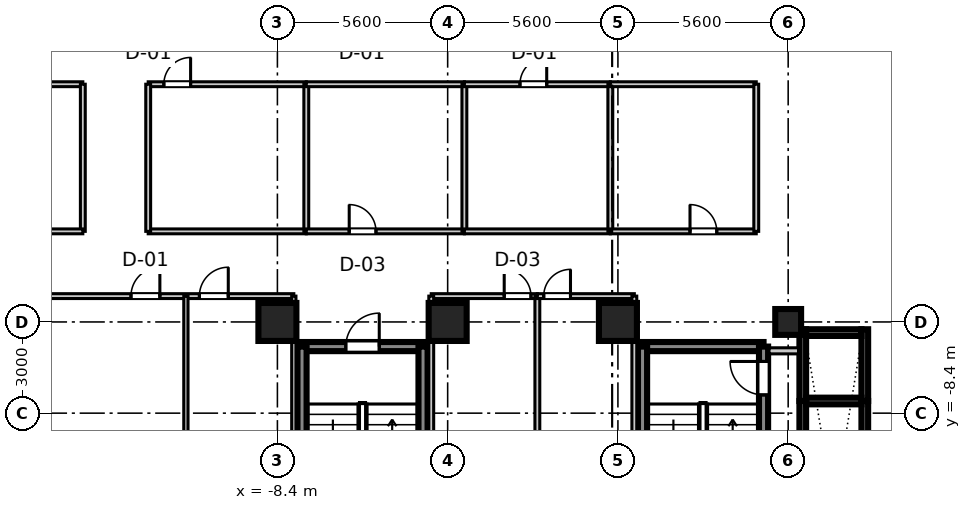
"""IFC4 building model, lengths in metres.
Left out: names, types, materials, properties, quantities, classifications, styles, units other than length and angle.
Written with IfcOpenShell. Run it as: python <this file> out.ifc"""

import sys

from ifc_helpers import new_model, si_unit, direction, frame, frame_2d, origin, origin_2d, place, context, subcontext, project, spatial, rectangle, extrude, source, transform, mapped, element, fill, save


model = new_model("IFC4")
c1 = context("Model", 3, precision=1e-05, world=origin(), true_north=direction((0.0, 1.0)))
c2 = subcontext(c1, "Body", "Model", "MODEL_VIEW")
j1 = project(units=[si_unit("LENGTHUNIT", "METRE"), si_unit("PLANEANGLEUNIT", "RADIAN")], contexts=[c1])
p1 = place(None, origin())
s1 = spatial("IfcSite", under=j1, at=p1, CompositionType="ELEMENT")
p2 = place(p1, origin())
s2 = spatial("IfcBuilding", under=s1, at=p2, CompositionType="ELEMENT")
p3 = place(p2, frame((0.0, 0.0, 132.1)))
s3 = spatial("IfcBuildingStorey", under=s2, at=p3, CompositionType="ELEMENT", Elevation=132.1)
m1 = source(origin(), c2, "Body", "SweptSolid", [
    extrude(rectangle(XDim=1.25, YDim=1.25, at=origin_2d()), origin(), (0.0, 0.0, 1.0), 3.605),
])
for number, where, z_axis, x_axis in (
    (1, (-8.4, -5.4, 0.0), (0.0, 0.0, 1.0), (1.0, 0.0, 0.0)),
    (2, (-2.8, -5.4, 0.0), (0.0, 0.0, 1.0), (1.0, 0.0, 0.0)),
    (3, (2.8, -5.4, 0.0), (0.0, 0.0, 1.0), (1.0, 0.0, 0.0)),
):
    element("IfcColumn", number, at=place(p3, frame(where, z_axis=z_axis, x_axis=x_axis)), inside=s3, PredefinedType="COLUMN", context=c2, shape_type="MappedRepresentation", body=[
        mapped(m1, transform((0.0, 0.0, 0.0), scale=1.0)),
    ])
m2 = source(origin(), c2, "Body", "SweptSolid", [
    extrude(rectangle(XDim=0.85, YDim=0.85, at=origin_2d()), origin(), (0.0, 0.0, 1.0), 3.605),
])
p4 = place(p3, frame((8.4, -5.4, 0.0), z_axis=(0.0, 0.0, 1.0), x_axis=(1.0, 0.0, 0.0)))
e4 = element("IfcColumn", 4, at=p4, inside=s3, PredefinedType="PILASTER", context=c2, shape_type="MappedRepresentation", body=[
    mapped(m2, transform((0.0, 0.0, 0.0), scale=1.0)),
])
m3 = source(origin(), c2, "Body", "SweptSolid", [
    extrude(rectangle(XDim=3.98, YDim=0.3, at=frame_2d((1.99, 0.0))), origin(), (0.0, 0.0, 1.0), 3.38),
])
p5 = place(p3, frame((3.61, -6.21, 0.0), z_axis=(0.0, 0.0, 1.0), x_axis=(1.0, 0.0, 0.0)))
e5 = element("IfcWall", 5, at=p5, inside=s3, PredefinedType="SHEAR", context=c2, shape_type="MappedRepresentation", body=[
    mapped(m3, transform((0.0, 0.0, 0.0), scale=1.0)),
])
m4 = source(origin(), c2, "Body", "SweptSolid", [
    extrude(rectangle(XDim=9.38, YDim=0.3, at=frame_2d((4.69, 0.0))), origin(), (0.0, 0.0, 1.0), 3.38),
])
p6 = place(p3, frame((3.61, -15.59, 0.0), z_axis=(0.0, 0.0, 1.0), x_axis=(0.0, 1.0, 0.0)))
e6 = element("IfcWall", 6, at=p6, inside=s3, PredefinedType="SHEAR", context=c2, shape_type="MappedRepresentation", body=[
    mapped(m4, transform((0.0, 0.0, 0.0), scale=1.0)),
])
p7 = place(p3, frame((7.59, -15.59, 0.0), z_axis=(0.0, 0.0, 1.0), x_axis=(0.0, 1.0, 0.0)))
e7 = element("IfcWall", 7, at=p7, inside=s3, PredefinedType="SHEAR", context=c2, shape_type="MappedRepresentation", body=[
    mapped(m4, transform((0.0, 0.0, 0.0), scale=1.0)),
])
p8 = place(p7, frame((7.79, 0.0, 0.0)))
e8 = element("IfcOpeningElement", 8, at=p8, cuts=e7, PredefinedType="OPENING", context=c2, shape_type="SweptSolid", body=[
    extrude(rectangle(XDim=1.1, YDim=2.15, at=frame_2d((0.55, 1.075))), frame((0.0, 0.16, 0.0), z_axis=(0.0, -1.0, 0.0), x_axis=(1.0, 0.0, 0.0)), (0.0, 0.0, 1.0), 0.32),
])
p9 = place(p3, frame((-7.59, -6.21, 0.0), z_axis=(0.0, 0.0, 1.0), x_axis=(1.0, 0.0, 0.0)))
e9 = element("IfcWall", 9, at=p9, inside=s3, PredefinedType="SHEAR", context=c2, shape_type="MappedRepresentation", body=[
    mapped(m3, transform((0.0, 0.0, 0.0), scale=1.0)),
])
p10 = place(p9, frame((1.44, 0.0, 0.0)))
e10 = element("IfcOpeningElement", 10, at=p10, cuts=e9, PredefinedType="OPENING", context=c2, shape_type="SweptSolid", body=[
    extrude(rectangle(XDim=1.1, YDim=2.15, at=frame_2d((0.55, 1.075))), frame((0.0, 0.16, 0.0), z_axis=(0.0, -1.0, 0.0), x_axis=(1.0, 0.0, 0.0)), (0.0, 0.0, 1.0), 0.32),
])
for number, where, z_axis, x_axis in (
    (11, (-7.59, -15.59, 0.0), (0.0, 0.0, 1.0), (0.0, 1.0, 0.0)),
    (12, (-3.61, -15.59, 0.0), (0.0, 0.0, 1.0), (0.0, 1.0, 0.0)),
):
    element("IfcWall", number, at=place(p3, frame(where, z_axis=z_axis, x_axis=x_axis)), inside=s3, PredefinedType="SHEAR", context=c2, shape_type="MappedRepresentation", body=[
        mapped(m4, transform((0.0, 0.0, 0.0), scale=1.0)),
    ])
m5 = source(origin(), c2, "Body", "SweptSolid", [
    extrude(rectangle(XDim=2.36, YDim=0.22, at=frame_2d((1.18, 0.0))), origin(), (0.0, 0.0, 1.0), 3.38),
])
for number, where, z_axis, x_axis in (
    (13, (8.88, -8.0, 0.0), (0.0, 0.0, 1.0), (0.0, 1.0, 0.0)),
    (14, (10.92, -8.0, 0.0), (0.0, 0.0, 1.0), (0.0, 1.0, 0.0)),
):
    element("IfcWall", number, at=place(p3, frame(where, z_axis=z_axis, x_axis=x_axis)), inside=s3, PredefinedType="SHEAR", context=c2, shape_type="MappedRepresentation", body=[
        mapped(m5, transform((0.0, 0.0, 0.0), scale=1.0)),
    ])
m6 = source(origin(), c2, "Body", "SweptSolid", [
    extrude(rectangle(XDim=1.82, YDim=0.22, at=frame_2d((0.91, 0.0))), origin(), (0.0, 0.0, 1.0), 3.38),
])
p11 = place(p3, frame((8.99, -5.75, 0.0), z_axis=(0.0, 0.0, 1.0), x_axis=(1.0, 0.0, 0.0)))
e15 = element("IfcWall", 15, at=p11, inside=s3, PredefinedType="SHEAR", context=c2, shape_type="MappedRepresentation", body=[
    mapped(m6, transform((0.0, 0.0, 0.0), scale=1.0)),
])
m7 = source(origin(), c2, "Body", "SweptSolid", [
    extrude(rectangle(XDim=2.2, YDim=0.22, at=frame_2d((1.1, 0.0))), origin(), (0.0, 0.0, 1.0), 3.38),
])
for number, where, z_axis, x_axis in (
    (16, (8.88, -10.2, 0.0), (0.0, 0.0, 1.0), (0.0, 1.0, 0.0)),
    (17, (10.92, -10.2, 0.0), (0.0, 0.0, 1.0), (0.0, 1.0, 0.0)),
):
    element("IfcWall", number, at=place(p3, frame(where, z_axis=z_axis, x_axis=x_axis)), inside=s3, PredefinedType="SHEAR", context=c2, shape_type="MappedRepresentation", body=[
        mapped(m7, transform((0.0, 0.0, 0.0), scale=1.0)),
    ])
m8 = source(origin(), c2, "Body", "SweptSolid", [
    extrude(rectangle(XDim=1.82, YDim=0.22, at=frame_2d((0.91, 0.0))), origin(), (0.0, 0.0, 1.0), 3.65),
])
p12 = place(p3, frame((8.99, -8.0, 0.0), z_axis=(0.0, 0.0, 1.0), x_axis=(1.0, 0.0, 0.0)))
e18 = element("IfcWall", 18, at=p12, inside=s3, PredefinedType="SHEAR", context=c2, shape_type="MappedRepresentation", body=[
    mapped(m8, transform((0.0, 0.0, 0.0), scale=1.0)),
])
m9 = source(origin(), c2, "Body", "SweptSolid", [
    extrude(rectangle(XDim=0.97, YDim=0.2, at=frame_2d((0.485, 0.0))), origin(), (0.0, 0.0, 1.0), 2.72),
])
p13 = place(p3, frame((7.77, -6.35, 0.0), z_axis=(0.0, 0.0, 1.0), x_axis=(1.0, 0.0, 0.0)))
e19 = element("IfcWall", 19, at=p13, inside=s3, PredefinedType="PARTITIONING", context=c2, shape_type="MappedRepresentation", body=[
    mapped(m9, transform((0.0, 0.0, 0.0), scale=1.0)),
])
m10 = source(origin(), c2, "Body", "SweptSolid", [
    extrude(rectangle(XDim=13.2, YDim=0.16, at=frame_2d((6.6, 0.0))), origin(), (0.0, 0.0, 1.0), 2.72),
])
p14 = place(p3, frame((-21.06, -4.55, 0.0), z_axis=(0.0, 0.0, 1.0), x_axis=(1.0, 0.0, 0.0)))
e20 = element("IfcWall", 20, at=p14, inside=s3, PredefinedType="PARTITIONING", context=c2, shape_type="MappedRepresentation", body=[
    mapped(m10, transform((0.0, 0.0, 0.0), scale=1.0)),
])
p15 = place(p14, frame((0.448, 0.0, 0.0)))
e21 = element("IfcOpeningElement", 21, at=p15, cuts=e20, PredefinedType="OPENING", context=c2, shape_type="SweptSolid", body=[
    extrude(rectangle(XDim=0.95, YDim=2.1, at=frame_2d((0.475, 1.05))), frame((0.0, 0.09, 0.0), z_axis=(0.0, -1.0, 0.0), x_axis=(1.0, 0.0, 0.0)), (0.0, 0.0, 1.0), 0.18),
])
p16 = place(p14, frame((7.844, 0.0, 0.0)))
e22 = element("IfcOpeningElement", 22, at=p16, cuts=e20, PredefinedType="OPENING", context=c2, shape_type="SweptSolid", body=[
    extrude(rectangle(XDim=0.95, YDim=2.1, at=frame_2d((0.475, 1.05))), frame((0.0, 0.09, 0.0), z_axis=(0.0, -1.0, 0.0), x_axis=(1.0, 0.0, 0.0)), (0.0, 0.0, 1.0), 0.18),
])
p17 = place(p14, frame((10.094, 0.0, 0.0)))
e23 = element("IfcOpeningElement", 23, at=p17, cuts=e20, PredefinedType="OPENING", context=c2, shape_type="SweptSolid", body=[
    extrude(rectangle(XDim=0.95, YDim=2.1, at=frame_2d((0.475, 1.05))), frame((0.0, 0.09, 0.0), z_axis=(0.0, -1.0, 0.0), x_axis=(1.0, 0.0, 0.0)), (0.0, 0.0, 1.0), 0.18),
])
m11 = source(origin(), c2, "Body", "SweptSolid", [
    extrude(rectangle(XDim=19.25, YDim=0.14, at=frame_2d((9.625, 0.0))), origin(), (0.0, 0.0, 1.0), 2.72),
])
for number, where, z_axis, x_axis in (
    (24, (-7.86, -23.8, 0.0), (0.0, 0.0, 1.0), (0.0, 1.0, 0.0)),
    (25, (-11.41, -23.8, 0.0), (0.0, 0.0, 1.0), (0.0, 1.0, 0.0)),
):
    element("IfcWall", number, at=place(p3, frame(where, z_axis=z_axis, x_axis=x_axis)), inside=s3, PredefinedType="PARTITIONING", context=c2, shape_type="MappedRepresentation", body=[
        mapped(m11, transform((0.0, 0.0, 0.0), scale=1.0)),
    ])
m12 = source(origin(), c2, "Body", "SweptSolid", [
    extrude(rectangle(XDim=3.49, YDim=0.16, at=frame_2d((1.745, 0.0))), origin(), (0.0, 0.0, 1.0), 2.72),
])
p18 = place(p3, frame((-3.34, -4.55, 0.0), z_axis=(0.0, 0.0, 1.0), x_axis=(1.0, 0.0, 0.0)))
e26 = element("IfcWall", 26, at=p18, inside=s3, PredefinedType="PARTITIONING", context=c2, shape_type="MappedRepresentation", body=[
    mapped(m12, transform((0.0, 0.0, 0.0), scale=1.0)),
])
p19 = place(p18, frame((2.4, 0.0, 0.0)))
e27 = element("IfcOpeningElement", 27, at=p19, cuts=e26, PredefinedType="OPENING", context=c2, shape_type="SweptSolid", body=[
    extrude(rectangle(XDim=0.88, YDim=2.1, at=frame_2d((0.44, 1.05))), frame((0.0, 0.09, 0.0), z_axis=(0.0, -1.0, 0.0), x_axis=(1.0, 0.0, 0.0)), (0.0, 0.0, 1.0), 0.18),
])
m13 = source(origin(), c2, "Body", "SweptSolid", [
    extrude(rectangle(XDim=19.25, YDim=0.16, at=frame_2d((9.625, 0.0))), origin(), (0.0, 0.0, 1.0), 2.72),
])
for number, where, z_axis, x_axis in (
    (28, (-3.34, -23.8, 0.0), (0.0, 0.0, 1.0), (0.0, 1.0, 0.0)),
    (29, (0.15, -23.8, 0.0), (0.0, 0.0, 1.0), (0.0, 1.0, 0.0)),
):
    element("IfcWall", number, at=place(p3, frame(where, z_axis=z_axis, x_axis=x_axis)), inside=s3, PredefinedType="PARTITIONING", context=c2, shape_type="MappedRepresentation", body=[
        mapped(m13, transform((0.0, 0.0, 0.0), scale=1.0)),
    ])
m14 = source(origin(), c2, "Body", "SweptSolid", [
    extrude(rectangle(XDim=3.19, YDim=0.16, at=frame_2d((1.595, 0.0))), origin(), (0.0, 0.0, 1.0), 2.72),
])
p20 = place(p3, frame((0.15, -4.55, 0.0), z_axis=(0.0, 0.0, 1.0), x_axis=(1.0, 0.0, 0.0)))
e30 = element("IfcWall", 30, at=p20, inside=s3, PredefinedType="PARTITIONING", context=c2, shape_type="MappedRepresentation", body=[
    mapped(m14, transform((0.0, 0.0, 0.0), scale=1.0)),
])
p21 = place(p20, frame((0.21, 0.0, 0.0)))
e31 = element("IfcOpeningElement", 31, at=p21, cuts=e30, PredefinedType="OPENING", context=c2, shape_type="SweptSolid", body=[
    extrude(rectangle(XDim=0.88, YDim=2.1, at=frame_2d((0.44, 1.05))), frame((0.0, 0.09, 0.0), z_axis=(0.0, -1.0, 0.0), x_axis=(1.0, 0.0, 0.0)), (0.0, 0.0, 1.0), 0.18),
])
p22 = place(p3, frame((3.34, -23.8, 0.0), z_axis=(0.0, 0.0, 1.0), x_axis=(0.0, 1.0, 0.0)))
e32 = element("IfcWall", 32, at=p22, inside=s3, PredefinedType="PARTITIONING", context=c2, shape_type="MappedRepresentation", body=[
    mapped(m13, transform((0.0, 0.0, 0.0), scale=1.0)),
])
m15 = source(origin(), c2, "Body", "SweptSolid", [
    extrude(rectangle(XDim=9.0, YDim=0.16, at=frame_2d((4.5, 0.0))), origin(), (0.0, 0.0, 1.0), 2.72),
])
p23 = place(p3, frame((-23.8, 2.42, 0.0), z_axis=(0.0, 0.0, 1.0), x_axis=(1.0, 0.0, 0.0)))
e33 = element("IfcWall", 33, at=p23, inside=s3, PredefinedType="PARTITIONING", context=c2, shape_type="MappedRepresentation", body=[
    mapped(m15, transform((0.0, 0.0, 0.0), scale=1.0)),
])
p24 = place(p23, frame((2.176, 0.0, 0.0)))
e34 = element("IfcOpeningElement", 34, at=p24, cuts=e33, PredefinedType="OPENING", context=c2, shape_type="SweptSolid", body=[
    extrude(rectangle(XDim=1.5, YDim=2.15, at=frame_2d((0.75, 1.075))), frame((0.0, 0.09, 0.0), z_axis=(0.0, -1.0, 0.0), x_axis=(1.0, 0.0, 0.0)), (0.0, 0.0, 1.0), 0.18),
])
m16 = source(origin(), c2, "Body", "SweptSolid", [
    extrude(rectangle(XDim=4.84, YDim=0.16, at=frame_2d((2.42, 0.0))), origin(), (0.0, 0.0, 1.0), 2.72),
])
p25 = place(p3, frame((-14.8, -2.42, 0.0), z_axis=(0.0, 0.0, 1.0), x_axis=(0.0, 1.0, 0.0)))
e35 = element("IfcWall", 35, at=p25, inside=s3, PredefinedType="PARTITIONING", context=c2, shape_type="MappedRepresentation", body=[
    mapped(m16, transform((0.0, 0.0, 0.0), scale=1.0)),
])
p26 = place(p3, frame((-23.8, -2.42, 0.0), z_axis=(0.0, 0.0, 1.0), x_axis=(1.0, 0.0, 0.0)))
e36 = element("IfcWall", 36, at=p26, inside=s3, PredefinedType="PARTITIONING", context=c2, shape_type="MappedRepresentation", body=[
    mapped(m15, transform((0.0, 0.0, 0.0), scale=1.0)),
])
m17 = source(origin(), c2, "Body", "SweptSolid", [
    extrude(rectangle(XDim=5.2, YDim=0.16, at=frame_2d((2.6, 0.0))), origin(), (0.0, 0.0, 1.0), 2.72),
])
p27 = place(p3, frame((-12.65, -2.42, 0.0), z_axis=(0.0, 0.0, 1.0), x_axis=(1.0, 0.0, 0.0)))
e37 = element("IfcWall", 37, at=p27, inside=s3, PredefinedType="PARTITIONING", context=c2, shape_type="MappedRepresentation", body=[
    mapped(m17, transform((0.0, 0.0, 0.0), scale=1.0)),
])
p28 = place(p3, frame((-12.65, 2.42, 0.0), z_axis=(0.0, 0.0, 1.0), x_axis=(1.0, 0.0, 0.0)))
e38 = element("IfcWall", 38, at=p28, inside=s3, PredefinedType="PARTITIONING", context=c2, shape_type="MappedRepresentation", body=[
    mapped(m17, transform((0.0, 0.0, 0.0), scale=1.0)),
])
p29 = place(p28, frame((0.515, 0.0, 0.0)))
e39 = element("IfcOpeningElement", 39, at=p29, cuts=e38, PredefinedType="OPENING", context=c2, shape_type="SweptSolid", body=[
    extrude(rectangle(XDim=0.88, YDim=2.1, at=frame_2d((0.44, 1.05))), frame((0.0, 0.09, 0.0), z_axis=(0.0, -1.0, 0.0), x_axis=(1.0, 0.0, 0.0)), (0.0, 0.0, 1.0), 0.18),
])
for number, where, z_axis, x_axis in (
    (40, (-12.65, -2.42, 0.0), (0.0, 0.0, 1.0), (0.0, 1.0, 0.0)),
    (41, (-7.45, -2.42, 0.0), (0.0, 0.0, 1.0), (0.0, 1.0, 0.0)),
):
    element("IfcWall", number, at=place(p3, frame(where, z_axis=z_axis, x_axis=x_axis)), inside=s3, PredefinedType="PARTITIONING", context=c2, shape_type="MappedRepresentation", body=[
        mapped(m16, transform((0.0, 0.0, 0.0), scale=1.0)),
    ])
p30 = place(p3, frame((-7.45, -2.42, 0.0), z_axis=(0.0, 0.0, 1.0), x_axis=(1.0, 0.0, 0.0)))
e42 = element("IfcWall", 42, at=p30, inside=s3, PredefinedType="PARTITIONING", context=c2, shape_type="MappedRepresentation", body=[
    mapped(m17, transform((0.0, 0.0, 0.0), scale=1.0)),
])
p31 = place(p30, frame((1.412, 0.0, 0.0)))
e43 = element("IfcOpeningElement", 43, at=p31, cuts=e42, PredefinedType="OPENING", context=c2, shape_type="SweptSolid", body=[
    extrude(rectangle(XDim=0.88, YDim=2.1, at=frame_2d((0.44, 1.05))), frame((0.0, 0.09, 0.0), z_axis=(0.0, -1.0, 0.0), x_axis=(1.0, 0.0, 0.0)), (0.0, 0.0, 1.0), 0.18),
])
p32 = place(p3, frame((-7.45, 2.42, 0.0), z_axis=(0.0, 0.0, 1.0), x_axis=(1.0, 0.0, 0.0)))
e44 = element("IfcWall", 44, at=p32, inside=s3, PredefinedType="PARTITIONING", context=c2, shape_type="MappedRepresentation", body=[
    mapped(m17, transform((0.0, 0.0, 0.0), scale=1.0)),
])
p33 = place(p3, frame((-2.25, -2.42, 0.0), z_axis=(0.0, 0.0, 1.0), x_axis=(0.0, 1.0, 0.0)))
e45 = element("IfcWall", 45, at=p33, inside=s3, PredefinedType="PARTITIONING", context=c2, shape_type="MappedRepresentation", body=[
    mapped(m16, transform((0.0, 0.0, 0.0), scale=1.0)),
])
m18 = source(origin(), c2, "Body", "SweptSolid", [
    extrude(rectangle(XDim=4.8, YDim=0.16, at=frame_2d((2.4, 0.0))), origin(), (0.0, 0.0, 1.0), 2.72),
])
p34 = place(p3, frame((-2.25, -2.42, 0.0), z_axis=(0.0, 0.0, 1.0), x_axis=(1.0, 0.0, 0.0)))
e46 = element("IfcWall", 46, at=p34, inside=s3, PredefinedType="PARTITIONING", context=c2, shape_type="MappedRepresentation", body=[
    mapped(m18, transform((0.0, 0.0, 0.0), scale=1.0)),
])
p35 = place(p3, frame((-2.25, 2.42, 0.0), z_axis=(0.0, 0.0, 1.0), x_axis=(1.0, 0.0, 0.0)))
e47 = element("IfcWall", 47, at=p35, inside=s3, PredefinedType="PARTITIONING", context=c2, shape_type="MappedRepresentation", body=[
    mapped(m18, transform((0.0, 0.0, 0.0), scale=1.0)),
])
p36 = place(p35, frame((1.828, 0.0, 0.0)))
e48 = element("IfcOpeningElement", 48, at=p36, cuts=e47, PredefinedType="OPENING", context=c2, shape_type="SweptSolid", body=[
    extrude(rectangle(XDim=0.88, YDim=2.1, at=frame_2d((0.44, 1.05))), frame((0.0, 0.09, 0.0), z_axis=(0.0, -1.0, 0.0), x_axis=(1.0, 0.0, 0.0)), (0.0, 0.0, 1.0), 0.18),
])
p37 = place(p3, frame((2.55, -2.42, 0.0), z_axis=(0.0, 0.0, 1.0), x_axis=(0.0, 1.0, 0.0)))
e49 = element("IfcWall", 49, at=p37, inside=s3, PredefinedType="PARTITIONING", context=c2, shape_type="MappedRepresentation", body=[
    mapped(m16, transform((0.0, 0.0, 0.0), scale=1.0)),
])
p38 = place(p3, frame((2.55, -2.42, 0.0), z_axis=(0.0, 0.0, 1.0), x_axis=(1.0, 0.0, 0.0)))
e50 = element("IfcWall", 50, at=p38, inside=s3, PredefinedType="PARTITIONING", context=c2, shape_type="MappedRepresentation", body=[
    mapped(m18, transform((0.0, 0.0, 0.0), scale=1.0)),
])
p39 = place(p38, frame((2.621, 0.0, 0.0)))
e51 = element("IfcOpeningElement", 51, at=p39, cuts=e50, PredefinedType="OPENING", context=c2, shape_type="SweptSolid", body=[
    extrude(rectangle(XDim=0.88, YDim=2.1, at=frame_2d((0.44, 1.05))), frame((0.0, 0.09, 0.0), z_axis=(0.0, -1.0, 0.0), x_axis=(1.0, 0.0, 0.0)), (0.0, 0.0, 1.0), 0.18),
])
p40 = place(p3, frame((2.55, 2.42, 0.0), z_axis=(0.0, 0.0, 1.0), x_axis=(1.0, 0.0, 0.0)))
e52 = element("IfcWall", 52, at=p40, inside=s3, PredefinedType="PARTITIONING", context=c2, shape_type="MappedRepresentation", body=[
    mapped(m18, transform((0.0, 0.0, 0.0), scale=1.0)),
])
p41 = place(p3, frame((7.35, -2.42, 0.0), z_axis=(0.0, 0.0, 1.0), x_axis=(0.0, 1.0, 0.0)))
e53 = element("IfcWall", 53, at=p41, inside=s3, PredefinedType="PARTITIONING", context=c2, shape_type="MappedRepresentation", body=[
    mapped(m16, transform((0.0, 0.0, 0.0), scale=1.0)),
])
m19 = source(origin(), c2, "Body", "SweptSolid", [
    extrude(rectangle(XDim=1.1, YDim=2.15, at=frame_2d((0.55, 1.075))), frame((0.0, 0.025, 0.0), z_axis=(0.0, -1.0, 0.0), x_axis=(1.0, 0.0, 0.0)), (0.0, 0.0, 1.0), 0.05),
])
p42 = place(p8, origin())
e54 = element("IfcDoor", 54, at=p42, inside=s3, OperationType="SINGLE_SWING_RIGHT", PredefinedType="DOOR", context=c2, shape_type="MappedRepresentation", body=[
    mapped(m19, transform((0.0, 0.0, 0.0), scale=1.0)),
])
fill(e8, e54)
p43 = place(p10, frame((1.1, 0.0, 0.0), z_axis=(0.0, 0.0, 1.0), x_axis=(-1.0, 0.0, 0.0)))
e55 = element("IfcDoor", 55, at=p43, inside=s3, OperationType="SINGLE_SWING_RIGHT", PredefinedType="DOOR", context=c2, shape_type="MappedRepresentation", body=[
    mapped(m19, transform((0.0, 0.0, 0.0), scale=1.0)),
])
fill(e10, e55)
m20 = source(origin(), c2, "Body", "SweptSolid", [
    extrude(rectangle(XDim=0.95, YDim=2.1, at=frame_2d((0.475, 1.05))), frame((0.0, 0.025, 0.0), z_axis=(0.0, -1.0, 0.0), x_axis=(1.0, 0.0, 0.0)), (0.0, 0.0, 1.0), 0.05),
])
p44 = place(p16, frame((0.95, 0.0, 0.0), z_axis=(0.0, 0.0, 1.0), x_axis=(-1.0, 0.0, 0.0)))
e56 = element("IfcDoor", 56, at=p44, inside=s3, OperationType="SINGLE_SWING_RIGHT", PredefinedType="DOOR", context=c2, shape_type="MappedRepresentation", body=[
    mapped(m20, transform((0.0, 0.0, 0.0), scale=1.0)),
])
fill(e22, e56)
p45 = place(p17, frame((0.95, 0.0, 0.0), z_axis=(0.0, 0.0, 1.0), x_axis=(-1.0, 0.0, 0.0)))
e57 = element("IfcDoor", 57, at=p45, inside=s3, OperationType="SINGLE_SWING_RIGHT", PredefinedType="DOOR", context=c2, shape_type="MappedRepresentation", body=[
    mapped(m20, transform((0.0, 0.0, 0.0), scale=1.0)),
])
fill(e23, e57)
m21 = source(origin(), c2, "Body", "SweptSolid", [
    extrude(rectangle(XDim=0.88, YDim=2.1, at=frame_2d((0.44, 1.05))), frame((0.0, 0.025, 0.0), z_axis=(0.0, -1.0, 0.0), x_axis=(1.0, 0.0, 0.0)), (0.0, 0.0, 1.0), 0.05),
])
p46 = place(p19, frame((0.88, 0.0, 0.0), z_axis=(0.0, 0.0, 1.0), x_axis=(-1.0, 0.0, 0.0)))
e58 = element("IfcDoor", 58, at=p46, inside=s3, OperationType="SINGLE_SWING_LEFT", PredefinedType="DOOR", context=c2, shape_type="MappedRepresentation", body=[
    mapped(m21, transform((0.0, 0.0, 0.0), scale=1.0)),
])
fill(e27, e58)
p47 = place(p21, frame((0.88, 0.0, 0.0), z_axis=(0.0, 0.0, 1.0), x_axis=(-1.0, 0.0, 0.0)))
e59 = element("IfcDoor", 59, at=p47, inside=s3, OperationType="SINGLE_SWING_RIGHT", PredefinedType="DOOR", context=c2, shape_type="MappedRepresentation", body=[
    mapped(m21, transform((0.0, 0.0, 0.0), scale=1.0)),
])
fill(e31, e59)
p48 = place(p29, frame((0.88, 0.0, 0.0), z_axis=(0.0, 0.0, 1.0), x_axis=(-1.0, 0.0, 0.0)))
e60 = element("IfcDoor", 60, at=p48, inside=s3, OperationType="SINGLE_SWING_RIGHT", PredefinedType="DOOR", context=c2, shape_type="MappedRepresentation", body=[
    mapped(m21, transform((0.0, 0.0, 0.0), scale=1.0)),
])
fill(e39, e60)
p49 = place(p31, origin())
e61 = element("IfcDoor", 61, at=p49, inside=s3, OperationType="SINGLE_SWING_LEFT", PredefinedType="DOOR", context=c2, shape_type="MappedRepresentation", body=[
    mapped(m21, transform((0.0, 0.0, 0.0), scale=1.0)),
])
fill(e43, e61)
p50 = place(p36, frame((0.88, 0.0, 0.0), z_axis=(0.0, 0.0, 1.0), x_axis=(-1.0, 0.0, 0.0)))
e62 = element("IfcDoor", 62, at=p50, inside=s3, OperationType="SINGLE_SWING_RIGHT", PredefinedType="DOOR", context=c2, shape_type="MappedRepresentation", body=[
    mapped(m21, transform((0.0, 0.0, 0.0), scale=1.0)),
])
fill(e48, e62)
p51 = place(p39, origin())
e63 = element("IfcDoor", 63, at=p51, inside=s3, OperationType="SINGLE_SWING_LEFT", PredefinedType="DOOR", context=c2, shape_type="MappedRepresentation", body=[
    mapped(m21, transform((0.0, 0.0, 0.0), scale=1.0)),
])
fill(e51, e63)
save(model, sys.argv[1])
